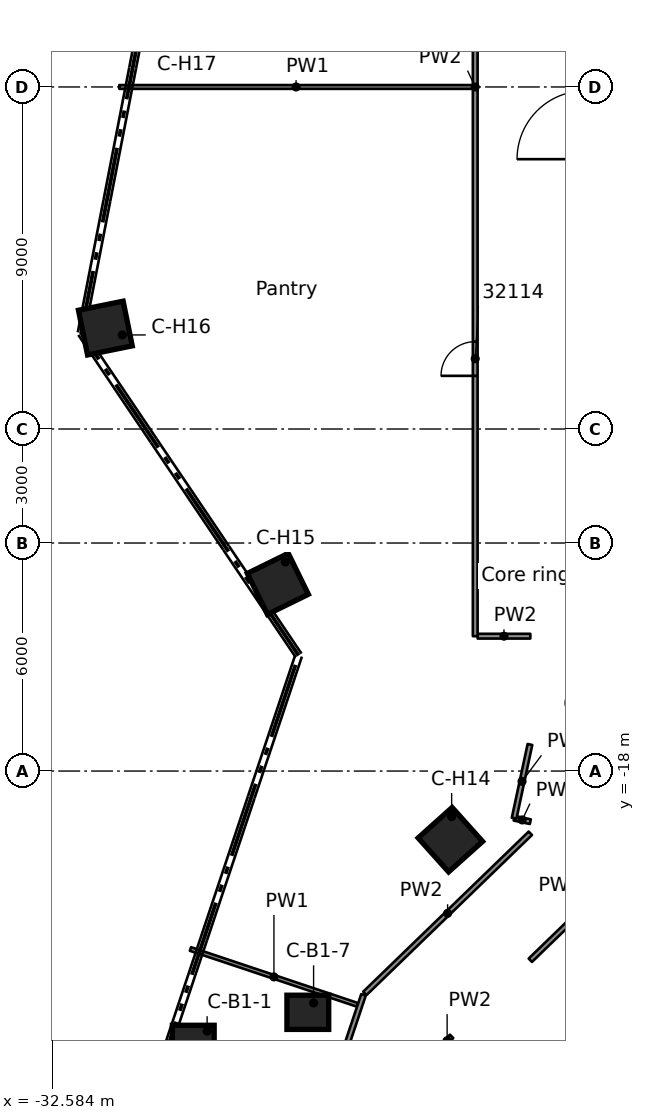
"""IFC4 building model, lengths in metres.
Left out: names, types, materials, properties, quantities, classifications, styles, units other than length and angle.
Written with IfcOpenShell. Run it as: python <this file> out.ifc"""

import sys

from ifc_helpers import new_model, si_unit, direction, frame, frame_2d, origin, origin_2d, place, context, subcontext, project, spatial, rectangle, extrude, element, fill, save


model = new_model("IFC4")
c1 = context("Model", 3, precision=1e-05, world=origin(), true_north=direction((0.0, 1.0)))
c2 = subcontext(c1, "Body", "Model", "MODEL_VIEW")
j1 = project(units=[si_unit("LENGTHUNIT", "METRE"), si_unit("PLANEANGLEUNIT", "RADIAN")], contexts=[c1])
p1 = place(None, origin())
s1 = spatial("IfcSite", under=j1, at=p1, CompositionType="ELEMENT")
p2 = place(p1, origin())
s2 = spatial("IfcBuilding", under=s1, at=p2, CompositionType="ELEMENT")
p3 = place(p2, frame((0.0, 0.0, 159.6)))
s3 = spatial("IfcBuildingStorey", under=s2, at=p3, CompositionType="ELEMENT", Elevation=159.6)
for number, where, z_axis, x_axis in (
    (1, (-28.869, -25.139, 0.0), (0.0, 0.0, 1.0), (1.0, 0.0, 0.0)),
    (2, (-25.855, -24.348, 0.0), (0.0, 0.0, 1.0), (1.0, 0.0, 0.0)),
):
    element("IfcColumn", number, at=place(p3, frame(where, z_axis=z_axis, x_axis=x_axis)), inside=s3, PredefinedType="COLUMN", context=c2, shape_type="SweptSolid", body=[
        extrude(rectangle(XDim=1.1, YDim=0.9, at=origin_2d()), origin(), (0.0, 0.0, 1.0), 3.5),
    ])
for number, where, z_axis, x_axis in (
    (3, (-22.104, -19.806, 0.0), (0.0, 0.0, 1.0), (-0.745, -0.667, 0.0)),
    (4, (-26.644, -13.075, 0.0), (0.0, 0.0, 1.0), (-0.898, -0.441, 0.0)),
    (5, (-31.183, -6.344, 0.0), (0.0, 0.0, 1.0), (-0.98, -0.199, 0.0)),
):
    element("IfcColumn", number, at=place(p3, frame(where, z_axis=z_axis, x_axis=x_axis)), inside=s3, PredefinedType="COLUMN", context=c2, shape_type="SweptSolid", body=[
        extrude(rectangle(XDim=1.2, YDim=1.2, at=origin_2d()), origin(), (0.0, 0.0, 1.0), 3.5),
    ])
p4 = place(p3, frame((-28.943, -22.682, 0.0), z_axis=(0.0, 0.0, 1.0), x_axis=(0.948361239818, -0.317192305725, 0.0)))
e6 = element("IfcWall", 6, at=p4, inside=s3, PredefinedType="PARTITIONING", context=c2, shape_type="SweptSolid", body=[
    extrude(rectangle(XDim=4.631, YDim=0.1, at=frame_2d((2.316, 0.0))), origin(), (0.0, 0.0, 1.0), 3.08),
])
p5 = place(p3, frame((-20.425, -19.241, 0.0), z_axis=(0.0, 0.0, 1.0), x_axis=(0.977810632408, -0.209490732848, 0.0)))
e7 = element("IfcWall", 7, at=p5, inside=s3, PredefinedType="PARTITIONING", context=c2, shape_type="SweptSolid", body=[
    extrude(rectangle(XDim=0.435, YDim=0.125, at=frame_2d((0.217, 0.0))), origin(), (0.0, 0.0, 1.0), 3.08),
])
p6 = place(p3, frame((-21.387, -14.451, 0.0), z_axis=(0.0, 0.0, 1.0), x_axis=(1.0, 0.0, 0.0)))
e8 = element("IfcWall", 8, at=p6, inside=s3, PredefinedType="PARTITIONING", context=c2, shape_type="SweptSolid", body=[
    extrude(rectangle(XDim=1.387, YDim=0.125, at=frame_2d((0.693, 0.0))), origin(), (0.0, 0.0, 1.0), 3.08),
])
p7 = place(p3, frame((-30.816, 0.0, 0.0), z_axis=(0.0, 0.0, 1.0), x_axis=(1.0, 0.0, 0.0)))
e9 = element("IfcWall", 9, at=p7, inside=s3, PredefinedType="PARTITIONING", context=c2, shape_type="SweptSolid", body=[
    extrude(rectangle(XDim=9.304, YDim=0.1, at=frame_2d((4.652, 0.0))), origin(), (0.0, 0.0, 1.0), 3.08),
])
p8 = place(p3, frame((-24.354, -23.85, 0.0), z_axis=(0.0, 0.0, 1.0), x_axis=(0.718717121229, 0.695302595747, 0.0)))
e10 = element("IfcWall", 10, at=p8, inside=s3, PredefinedType="PARTITIONING", context=c2, shape_type="SweptSolid", body=[
    extrude(rectangle(XDim=6.058, YDim=0.125, at=frame_2d((3.029, 0.0))), origin(), (0.0, 0.0, 1.0), 3.08),
])
p9 = place(p3, frame((-20.0, -22.978, 0.0), z_axis=(0.0, 0.0, 1.0), x_axis=(0.718705918195, 0.695314175859, 0.0)))
e11 = element("IfcWall", 11, at=p9, inside=s3, PredefinedType="PARTITIONING", context=c2, shape_type="SweptSolid", body=[
    extrude(rectangle(XDim=3.413, YDim=0.125, at=frame_2d((1.707, 0.0))), origin(), (0.0, 0.0, 1.0), 3.08),
])
p10 = place(p3, frame((-22.308, -25.211, 0.0), z_axis=(0.0, 0.0, 1.0), x_axis=(0.717743653734, 0.696307437505, 0.0)))
e12 = element("IfcWall", 12, at=p10, inside=s3, PredefinedType="PARTITIONING", context=c2, shape_type="SweptSolid", body=[
    extrude(rectangle(XDim=0.33, YDim=0.125, at=frame_2d((0.165, 0.0))), origin(), (0.0, 0.0, 1.0), 3.08),
])
p11 = place(p3, frame((-30.714, -42.764, 0.0), z_axis=(0.0, 0.0, 1.0), x_axis=(0.317699123241, 0.94819157721, 0.0)))
e13 = element("IfcWall", 13, at=p11, inside=s3, PredefinedType="PARTITIONING", context=c2, shape_type="SweptSolid", body=[
    extrude(rectangle(XDim=19.906, YDim=0.125, at=frame_2d((9.953, 0.0))), origin(), (0.0, 0.0, 1.0), 3.08),
])
p12 = place(p11, frame((16.35, 0.0, 0.0)))
e14 = element("IfcOpeningElement", 14, at=p12, cuts=e13, PredefinedType="OPENING", context=c2, shape_type="SweptSolid", body=[
    extrude(rectangle(XDim=0.9, YDim=2.1, at=frame_2d((0.45, 1.05))), frame((0.0, 0.073, 0.0), z_axis=(0.0, -1.0, 0.0), x_axis=(1.0, 0.0, 0.0)), (0.0, 0.0, 1.0), 0.145),
])
p13 = place(p11, frame((10.8, 0.0, 0.0)))
e15 = element("IfcOpeningElement", 15, at=p13, cuts=e13, PredefinedType="OPENING", context=c2, shape_type="SweptSolid", body=[
    extrude(rectangle(XDim=0.9, YDim=2.1, at=frame_2d((0.45, 1.05))), frame((0.0, 0.073, 0.0), z_axis=(0.0, -1.0, 0.0), x_axis=(1.0, 0.0, 0.0)), (0.0, 0.0, 1.0), 0.145),
])
p14 = place(p11, frame((3.051, 0.0, 0.0)))
e16 = element("IfcOpeningElement", 16, at=p14, cuts=e13, PredefinedType="OPENING", context=c2, shape_type="SweptSolid", body=[
    extrude(rectangle(XDim=0.9, YDim=2.1, at=frame_2d((0.45, 1.05))), frame((0.0, 0.073, 0.0), z_axis=(0.0, -1.0, 0.0), x_axis=(1.0, 0.0, 0.0)), (0.0, 0.0, 1.0), 0.145),
])
p15 = place(p3, frame((-20.426, -19.241, 0.0), z_axis=(0.0, 0.0, 1.0), x_axis=(0.20968034996, 0.97776998872, 0.0)))
e17 = element("IfcWall", 17, at=p15, inside=s3, PredefinedType="PARTITIONING", context=c2, shape_type="SweptSolid", body=[
    extrude(rectangle(XDim=1.984, YDim=0.125, at=frame_2d((0.992, 0.0))), origin(), (0.0, 0.0, 1.0), 3.08),
])
p16 = place(p3, frame((-21.45, -14.451, 0.0), z_axis=(0.0, 0.0, 1.0), x_axis=(0.0, 1.0, 0.0)))
e18 = element("IfcWall", 18, at=p16, inside=s3, PredefinedType="PARTITIONING", context=c2, shape_type="SweptSolid", body=[
    extrude(rectangle(XDim=28.902, YDim=0.125, at=frame_2d((14.451, 0.0))), origin(), (0.0, 0.0, 1.0), 3.08),
])
p17 = place(p16, frame((6.85, 0.0, 0.0)))
e19 = element("IfcOpeningElement", 19, at=p17, cuts=e18, PredefinedType="OPENING", context=c2, shape_type="SweptSolid", body=[
    extrude(rectangle(XDim=0.9, YDim=2.1, at=frame_2d((0.45, 1.05))), frame((0.0, 0.073, 0.0), z_axis=(0.0, -1.0, 0.0), x_axis=(1.0, 0.0, 0.0)), (0.0, 0.0, 1.0), 0.145),
])
p18 = place(p16, frame((20.801, 0.0, 0.0)))
e20 = element("IfcOpeningElement", 20, at=p18, cuts=e18, PredefinedType="OPENING", context=c2, shape_type="SweptSolid", body=[
    extrude(rectangle(XDim=1.8, YDim=2.1, at=frame_2d((0.9, 1.05))), frame((0.0, 0.073, 0.0), z_axis=(0.0, -1.0, 0.0), x_axis=(1.0, 0.0, 0.0)), (0.0, 0.0, 1.0), 0.145),
])
p19 = place(p17, origin())
e21 = element("IfcDoor", 21, at=p19, inside=s3, OperationType="SINGLE_SWING_LEFT", PredefinedType="DOOR", context=c2, shape_type="SweptSolid", body=[
    extrude(rectangle(XDim=0.9, YDim=2.1, at=frame_2d((0.45, 1.05))), frame((0.0, 0.025, 0.0), z_axis=(0.0, -1.0, 0.0), x_axis=(1.0, 0.0, 0.0)), (0.0, 0.0, 1.0), 0.05),
])
fill(e19, e21)
save(model, sys.argv[1])
